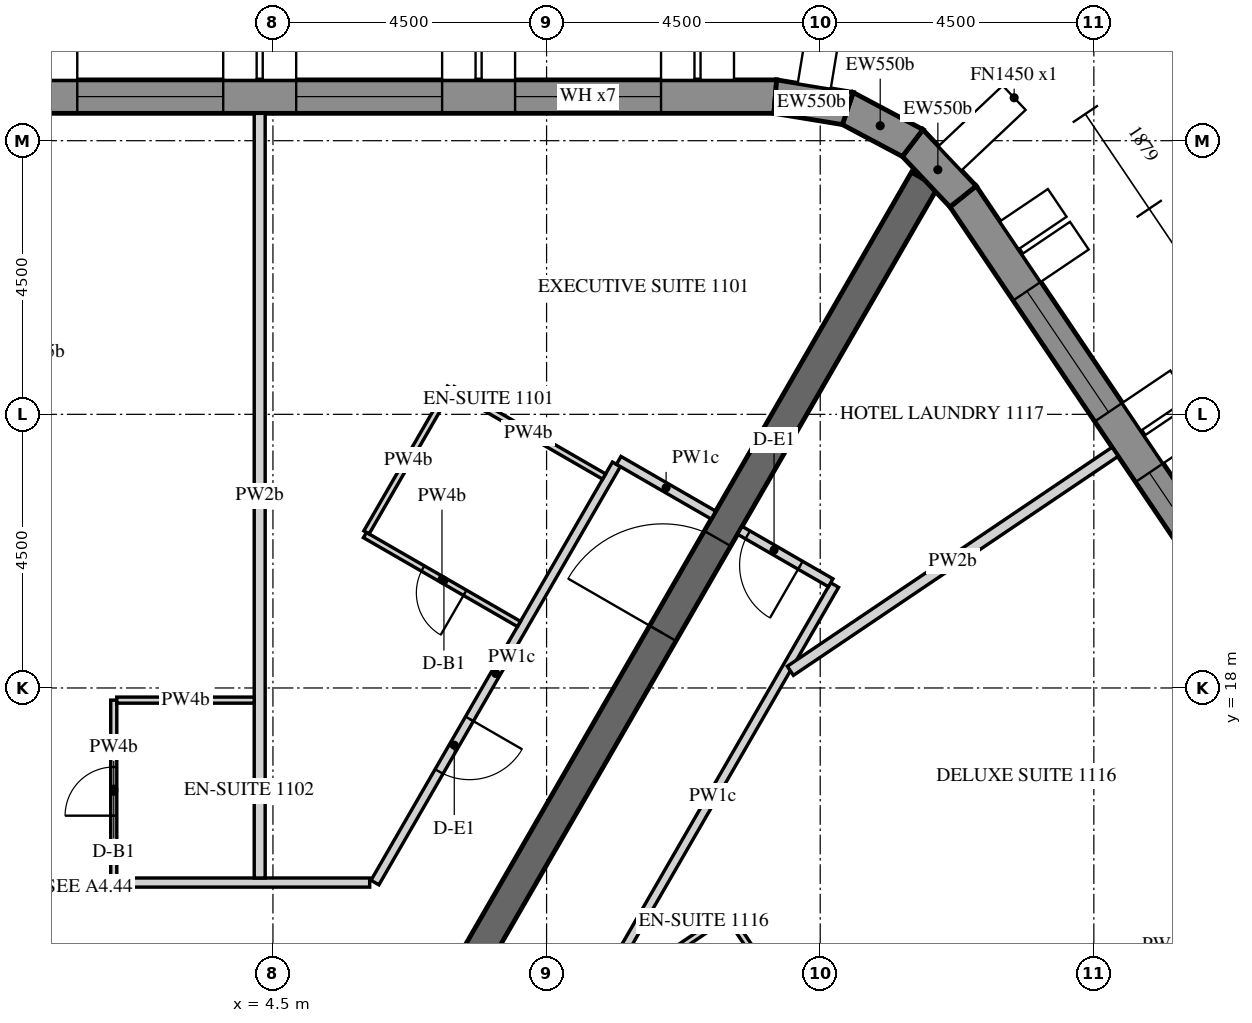
"""IFC4 building model, lengths in metres.
Left out: names, types, materials, properties, quantities, classifications, styles, units other than length and angle.
Written with IfcOpenShell. Run it as: python <this file> out.ifc"""

import sys

from ifc_helpers import new_model, si_unit, direction, frame, frame_2d, origin, place, context, subcontext, project, spatial, polyline, rectangle, outline, extrude, element, fill, save


model = new_model("IFC4")
c1 = context("Model", 3, precision=1e-05, world=origin(), true_north=direction((0.0, 1.0)))
c2 = subcontext(c1, "Body", "Model", "MODEL_VIEW")
j1 = project(units=[si_unit("LENGTHUNIT", "METRE"), si_unit("PLANEANGLEUNIT", "RADIAN")], contexts=[c1])
p1 = place(None, origin())
s1 = spatial("IfcSite", under=j1, at=p1, CompositionType="ELEMENT")
p2 = place(p1, origin())
s2 = spatial("IfcBuilding", under=s1, at=p2, CompositionType="ELEMENT")
p3 = place(p2, frame((0.0, 0.0, 152.7)))
s3 = spatial("IfcBuildingStorey", under=s2, at=p3, CompositionType="ELEMENT", Elevation=152.7)
p4 = place(p3, frame((12.761, 27.725, 0.0), z_axis=(0.0, 0.0, 1.0), x_axis=(-1.0, 0.0, 0.0)))
e1 = element("IfcWall", 1, at=p4, inside=s3, PredefinedType="SOLIDWALL", context=c2, shape_type="SweptSolid", body=[
    extrude(outline(polyline([(-0.022, -0.275), (27.783, -0.275), (27.732, 0.275), (0.022, 0.275), (-0.022, -0.275)])), origin(), (0.0, 0.0, 1.0), 3.75),
])
p5 = place(p4, frame((1.879, 0.0, 0.9)))
e2 = element("IfcOpeningElement", 2, at=p5, cuts=e1, PredefinedType="OPENING", context=c2, shape_type="SweptSolid", body=[
    extrude(rectangle(XDim=2.4, YDim=2.4, at=frame_2d((1.2, 1.2))), frame((0.0, 0.285, 0.0), z_axis=(0.0, -1.0, 0.0), x_axis=(1.0, 0.0, 0.0)), (0.0, 0.0, 1.0), 0.57),
])
p6 = place(p4, frame((5.479, 0.0, 0.9)))
e3 = element("IfcOpeningElement", 3, at=p6, cuts=e1, PredefinedType="OPENING", context=c2, shape_type="SweptSolid", body=[
    extrude(rectangle(XDim=2.4, YDim=2.4, at=frame_2d((1.2, 1.2))), frame((0.0, 0.285, 0.0), z_axis=(0.0, -1.0, 0.0), x_axis=(1.0, 0.0, 0.0)), (0.0, 0.0, 1.0), 0.57),
])
p7 = place(p4, frame((9.079, 0.0, 0.9)))
e4 = element("IfcOpeningElement", 4, at=p7, cuts=e1, PredefinedType="OPENING", context=c2, shape_type="SweptSolid", body=[
    extrude(rectangle(XDim=2.4, YDim=2.4, at=frame_2d((1.2, 1.2))), frame((0.0, 0.285, 0.0), z_axis=(0.0, -1.0, 0.0), x_axis=(1.0, 0.0, 0.0)), (0.0, 0.0, 1.0), 0.57),
])
p8 = place(p4, frame((12.679, 0.0, 0.9)))
e5 = element("IfcOpeningElement", 5, at=p8, cuts=e1, PredefinedType="OPENING", context=c2, shape_type="SweptSolid", body=[
    extrude(rectangle(XDim=2.4, YDim=2.4, at=frame_2d((1.2, 1.2))), frame((0.0, 0.285, 0.0), z_axis=(0.0, -1.0, 0.0), x_axis=(1.0, 0.0, 0.0)), (0.0, 0.0, 1.0), 0.57),
])
p9 = place(p4, frame((16.279, 0.0, 0.9)))
e6 = element("IfcOpeningElement", 6, at=p9, cuts=e1, PredefinedType="OPENING", context=c2, shape_type="SweptSolid", body=[
    extrude(rectangle(XDim=2.4, YDim=2.4, at=frame_2d((1.2, 1.2))), frame((0.0, 0.285, 0.0), z_axis=(0.0, -1.0, 0.0), x_axis=(1.0, 0.0, 0.0)), (0.0, 0.0, 1.0), 0.57),
])
p10 = place(p4, frame((19.879, 0.0, 0.9)))
e7 = element("IfcOpeningElement", 7, at=p10, cuts=e1, PredefinedType="OPENING", context=c2, shape_type="SweptSolid", body=[
    extrude(rectangle(XDim=2.4, YDim=2.4, at=frame_2d((1.2, 1.2))), frame((0.0, 0.285, 0.0), z_axis=(0.0, -1.0, 0.0), x_axis=(1.0, 0.0, 0.0)), (0.0, 0.0, 1.0), 0.57),
])
p11 = place(p4, frame((23.479, 0.0, 0.9)))
e8 = element("IfcOpeningElement", 8, at=p11, cuts=e1, PredefinedType="OPENING", context=c2, shape_type="SweptSolid", body=[
    extrude(rectangle(XDim=2.4, YDim=2.4, at=frame_2d((1.2, 1.2))), frame((0.0, 0.285, 0.0), z_axis=(0.0, -1.0, 0.0), x_axis=(1.0, 0.0, 0.0)), (0.0, 0.0, 1.0), 0.57),
])
p12 = place(p3, frame((31.371, 3.071, 0.0), z_axis=(0.0, 0.0, 1.0), x_axis=(-0.559189891278, 0.829039604297, 0.0)))
e9 = element("IfcWall", 9, at=p12, inside=s3, PredefinedType="SOLIDWALL", context=c2, shape_type="SweptSolid", body=[
    extrude(outline(polyline([(-0.026, -0.275), (27.781, -0.275), (27.736, 0.275), (0.026, 0.275), (-0.026, -0.275)])), origin(), (0.0, 0.0, 1.0), 3.75),
])
p13 = place(p12, frame((1.879, 0.0, 0.9)))
e10 = element("IfcOpeningElement", 10, at=p13, cuts=e9, PredefinedType="OPENING", context=c2, shape_type="SweptSolid", body=[
    extrude(rectangle(XDim=2.4, YDim=2.4, at=frame_2d((1.2, 1.2))), frame((0.0, 0.285, 0.0), z_axis=(0.0, -1.0, 0.0), x_axis=(1.0, 0.0, 0.0)), (0.0, 0.0, 1.0), 0.57),
])
p14 = place(p12, frame((5.479, 0.0, 0.9)))
e11 = element("IfcOpeningElement", 11, at=p14, cuts=e9, PredefinedType="OPENING", context=c2, shape_type="SweptSolid", body=[
    extrude(rectangle(XDim=2.4, YDim=2.4, at=frame_2d((1.2, 1.2))), frame((0.0, 0.285, 0.0), z_axis=(0.0, -1.0, 0.0), x_axis=(1.0, 0.0, 0.0)), (0.0, 0.0, 1.0), 0.57),
])
p15 = place(p12, frame((9.079, 0.0, 0.9)))
e12 = element("IfcOpeningElement", 12, at=p15, cuts=e9, PredefinedType="OPENING", context=c2, shape_type="SweptSolid", body=[
    extrude(rectangle(XDim=2.4, YDim=2.4, at=frame_2d((1.2, 1.2))), frame((0.0, 0.285, 0.0), z_axis=(0.0, -1.0, 0.0), x_axis=(1.0, 0.0, 0.0)), (0.0, 0.0, 1.0), 0.57),
])
p16 = place(p12, frame((12.679, 0.0, 0.9)))
e13 = element("IfcOpeningElement", 13, at=p16, cuts=e9, PredefinedType="OPENING", context=c2, shape_type="SweptSolid", body=[
    extrude(rectangle(XDim=2.4, YDim=2.4, at=frame_2d((1.2, 1.2))), frame((0.0, 0.285, 0.0), z_axis=(0.0, -1.0, 0.0), x_axis=(1.0, 0.0, 0.0)), (0.0, 0.0, 1.0), 0.57),
])
p17 = place(p12, frame((16.279, 0.0, 0.9)))
e14 = element("IfcOpeningElement", 14, at=p17, cuts=e9, PredefinedType="OPENING", context=c2, shape_type="SweptSolid", body=[
    extrude(rectangle(XDim=2.4, YDim=2.4, at=frame_2d((1.2, 1.2))), frame((0.0, 0.285, 0.0), z_axis=(0.0, -1.0, 0.0), x_axis=(1.0, 0.0, 0.0)), (0.0, 0.0, 1.0), 0.57),
])
p18 = place(p12, frame((19.879, 0.0, 0.9)))
e15 = element("IfcOpeningElement", 15, at=p18, cuts=e9, PredefinedType="OPENING", context=c2, shape_type="SweptSolid", body=[
    extrude(rectangle(XDim=2.4, YDim=2.4, at=frame_2d((1.2, 1.2))), frame((0.0, 0.285, 0.0), z_axis=(0.0, -1.0, 0.0), x_axis=(1.0, 0.0, 0.0)), (0.0, 0.0, 1.0), 0.57),
])
p19 = place(p12, frame((23.479, 0.0, 0.9)))
e16 = element("IfcOpeningElement", 16, at=p19, cuts=e9, PredefinedType="OPENING", context=c2, shape_type="SweptSolid", body=[
    extrude(rectangle(XDim=2.4, YDim=2.4, at=frame_2d((1.2, 1.2))), frame((0.0, 0.285, 0.0), z_axis=(0.0, -1.0, 0.0), x_axis=(1.0, 0.0, 0.0)), (0.0, 0.0, 1.0), 0.57),
])
p20 = place(p3, frame((15.849, 26.083, 0.0), z_axis=(0.0, 0.0, 1.0), x_axis=(-0.686196220404, 0.727416488061, 0.0)))
e17 = element("IfcWall", 17, at=p20, inside=s3, PredefinedType="SOLIDWALL", context=c2, shape_type="SweptSolid", body=[
    extrude(outline(polyline([(-0.022, -0.275), (1.253, -0.275), (1.163, 0.275), (0.022, 0.275), (-0.022, -0.275)])), origin(), (0.0, 0.0, 1.0), 3.75),
])
p21 = place(p3, frame((15.02, 26.962, 0.0), z_axis=(0.0, 0.0, 1.0), x_axis=(-0.882950818639, 0.469465495926, 0.0)))
e18 = element("IfcWall", 18, at=p21, inside=s3, PredefinedType="SOLIDWALL", context=c2, shape_type="SweptSolid", body=[
    extrude(outline(polyline([(-0.045, -0.275), (1.253, -0.275), (1.163, 0.275), (0.045, 0.275), (-0.045, -0.275)])), origin(), (0.0, 0.0, 1.0), 3.75),
])
p22 = place(p3, frame((13.953, 27.529, 0.0), z_axis=(0.0, 0.0, 1.0), x_axis=(-0.986751945211, 0.162236243244, 0.0)))
e19 = element("IfcWall", 19, at=p22, inside=s3, PredefinedType="SOLIDWALL", context=c2, shape_type="SweptSolid", body=[
    extrude(outline(polyline([(-0.045, -0.275), (1.231, -0.275), (1.186, 0.275), (0.045, 0.275), (-0.045, -0.275)])), origin(), (0.0, 0.0, 1.0), 3.75),
])
p23 = place(p3, frame((7.506, 13.0, 0.0), z_axis=(0.0, 0.0, 1.0), x_axis=(0.499988271576, 0.866032175087, 0.0)))
e20 = element("IfcWall", 20, at=p23, inside=s3, PredefinedType="SHEAR", context=c2, shape_type="SweptSolid", body=[
    extrude(rectangle(XDim=15.424, YDim=0.5, at=frame_2d((7.712, 0.0))), origin(), (0.0, 0.0, 1.0), 3.75),
])
p24 = place(p23, frame((6.812, 0.0, 0.0)))
e21 = element("IfcOpeningElement", 21, at=p24, cuts=e20, PredefinedType="OPENING", context=c2, shape_type="SweptSolid", body=[
    extrude(rectangle(XDim=1.8, YDim=2.4, at=frame_2d((0.9, 1.2))), frame((0.0, 0.26, 0.0), z_axis=(0.0, -1.0, 0.0), x_axis=(1.0, 0.0, 0.0)), (0.0, 0.0, 1.0), 0.52),
])
p25 = place(p3, frame((10.149, 21.678, 0.0), z_axis=(0.0, 0.0, 1.0), x_axis=(-0.499997422768, -0.866026891745, 0.0)))
e22 = element("IfcWall", 22, at=p25, inside=s3, PredefinedType="PARTITIONING", context=c2, shape_type="SweptSolid", body=[
    extrude(rectangle(XDim=7.942, YDim=0.15, at=frame_2d((3.971, 0.0))), origin(), (0.0, 0.0, 1.0), 2.823),
])
p26 = place(p25, frame((4.833, 0.0, 0.0)))
e23 = element("IfcOpeningElement", 23, at=p26, cuts=e22, PredefinedType="OPENING", context=c2, shape_type="SweptSolid", body=[
    extrude(rectangle(XDim=1.0, YDim=2.1, at=frame_2d((0.5, 1.05))), frame((0.0, 0.085, 0.0), z_axis=(0.0, -1.0, 0.0), x_axis=(1.0, 0.0, 0.0)), (0.0, 0.0, 1.0), 0.17),
])
p27 = place(p3, frame((6.091, 14.8, 0.0), z_axis=(0.0, 0.0, 1.0), x_axis=(-1.0, 0.0, 0.0)))
e24 = element("IfcWall", 24, at=p27, inside=s3, PredefinedType="PARTITIONING", context=c2, shape_type="SweptSolid", body=[
    extrude(rectangle(XDim=14.636, YDim=0.15, at=frame_2d((7.318, 0.0))), origin(), (0.0, 0.0, 1.0), 2.823),
])
p28 = place(p27, frame((7.909, 0.0, 0.0)))
e25 = element("IfcOpeningElement", 25, at=p28, cuts=e24, PredefinedType="OPENING", context=c2, shape_type="SweptSolid", body=[
    extrude(rectangle(XDim=1.0, YDim=2.1, at=frame_2d((0.5, 1.05))), frame((0.0, 0.085, 0.0), z_axis=(0.0, -1.0, 0.0), x_axis=(1.0, 0.0, 0.0)), (0.0, 0.0, 1.0), 0.17),
])
p29 = place(p3, frame((11.745, 20.843, 0.0), z_axis=(0.0, 0.0, 1.0), x_axis=(-0.865989075817, 0.500062916607, 0.0)))
e26 = element("IfcWall", 26, at=p29, inside=s3, PredefinedType="PARTITIONING", context=c2, shape_type="SweptSolid", body=[
    extrude(rectangle(XDim=1.8, YDim=0.15, at=frame_2d((0.9, 0.0))), origin(), (0.0, 0.0, 1.0), 2.823),
])
p30 = place(p3, frame((9.728, 12.75, 0.0), z_axis=(0.0, 0.0, 1.0), x_axis=(0.500007149838, 0.866021275784, 0.0)))
e27 = element("IfcWall", 27, at=p30, inside=s3, PredefinedType="PARTITIONING", context=c2, shape_type="SweptSolid", body=[
    extrude(rectangle(XDim=8.017, YDim=0.15, at=frame_2d((4.009, 0.0))), origin(), (0.0, 0.0, 1.0), 2.823),
])
p31 = place(p3, frame((13.672, 19.73, 0.0), z_axis=(0.0, 0.0, 1.0), x_axis=(-0.866074815912, 0.499914405916, 0.0)))
e28 = element("IfcWall", 28, at=p31, inside=s3, PredefinedType="PARTITIONING", context=c2, shape_type="SweptSolid", body=[
    extrude(rectangle(XDim=1.725, YDim=0.15, at=frame_2d((0.862, 0.0))), origin(), (0.0, 0.0, 1.0), 2.823),
])
p32 = place(p31, frame((0.575, 0.0, 0.0)))
e29 = element("IfcOpeningElement", 29, at=p32, cuts=e28, PredefinedType="OPENING", context=c2, shape_type="SweptSolid", body=[
    extrude(rectangle(XDim=1.0, YDim=2.1, at=frame_2d((0.5, 1.05))), frame((0.0, 0.085, 0.0), z_axis=(0.0, -1.0, 0.0), x_axis=(1.0, 0.0, 0.0)), (0.0, 0.0, 1.0), 0.17),
])
p33 = place(p3, frame((8.546, 19.052, 0.0), z_axis=(0.0, 0.0, 1.0), x_axis=(-0.866046596414, 0.499963291492, 0.0)))
e30 = element("IfcWall", 30, at=p33, inside=s3, PredefinedType="PARTITIONING", context=c2, shape_type="SweptSolid", body=[
    extrude(rectangle(XDim=2.925, YDim=0.1, at=frame_2d((1.462, 0.0))), origin(), (0.0, 0.0, 1.0), 2.823),
])
p34 = place(p33, frame((1.025, 0.0, 0.0)))
e31 = element("IfcOpeningElement", 31, at=p34, cuts=e30, PredefinedType="OPENING", context=c2, shape_type="SweptSolid", body=[
    extrude(rectangle(XDim=0.8, YDim=2.1, at=frame_2d((0.4, 1.05))), frame((0.0, 0.06, 0.0), z_axis=(0.0, -1.0, 0.0), x_axis=(1.0, 0.0, 0.0)), (0.0, 0.0, 1.0), 0.12),
])
p35 = place(p3, frame((6.038, 20.558, 0.0), z_axis=(0.0, 0.0, 1.0), x_axis=(0.499996545922, 0.866027397988, 0.0)))
e32 = element("IfcWall", 32, at=p35, inside=s3, PredefinedType="PARTITIONING", context=c2, shape_type="SweptSolid", body=[
    extrude(rectangle(XDim=2.75, YDim=0.1, at=frame_2d((1.375, 0.0))), origin(), (0.0, 0.0, 1.0), 2.823),
])
p36 = place(p3, frame((7.456, 22.915, 0.0), z_axis=(0.0, 0.0, 1.0), x_axis=(0.866018712932, -0.500011588718, 0.0)))
e33 = element("IfcWall", 33, at=p36, inside=s3, PredefinedType="PARTITIONING", context=c2, shape_type="SweptSolid", body=[
    extrude(rectangle(XDim=2.875, YDim=0.1, at=frame_2d((1.438, 0.0))), origin(), (0.0, 0.0, 1.0), 2.823),
])
p37 = place(p3, frame((4.282, 27.45, 0.0), z_axis=(0.0, 0.0, 1.0), x_axis=(0.0, -1.0, 0.0)))
e34 = element("IfcWall", 34, at=p37, inside=s3, PredefinedType="PARTITIONING", context=c2, shape_type="SweptSolid", body=[
    extrude(rectangle(XDim=12.575, YDim=0.18, at=frame_2d((6.288, 0.0))), origin(), (0.0, 0.0, 1.0), 2.823),
])
p38 = place(p3, frame((1.882, 14.875, 0.0), z_axis=(0.0, 0.0, 1.0), x_axis=(0.0, 1.0, 0.0)))
e35 = element("IfcWall", 35, at=p38, inside=s3, PredefinedType="PARTITIONING", context=c2, shape_type="SweptSolid", body=[
    extrude(rectangle(XDim=2.925, YDim=0.1, at=frame_2d((1.462, 0.0))), origin(), (0.0, 0.0, 1.0), 2.823),
])
p39 = place(p38, frame((1.025, 0.0, 0.0)))
e36 = element("IfcOpeningElement", 36, at=p39, cuts=e35, PredefinedType="OPENING", context=c2, shape_type="SweptSolid", body=[
    extrude(rectangle(XDim=0.8, YDim=2.1, at=frame_2d((0.4, 1.05))), frame((0.0, 0.06, 0.0), z_axis=(0.0, -1.0, 0.0), x_axis=(1.0, 0.0, 0.0)), (0.0, 0.0, 1.0), 0.12),
])
p40 = place(p3, frame((1.932, 17.8, 0.0), z_axis=(0.0, 0.0, 1.0), x_axis=(1.0, 0.0, 0.0)))
e37 = element("IfcWall", 37, at=p40, inside=s3, PredefinedType="PARTITIONING", context=c2, shape_type="SweptSolid", body=[
    extrude(rectangle(XDim=2.26, YDim=0.1, at=frame_2d((1.13, 0.0))), origin(), (0.0, 0.0, 1.0), 2.823),
])
p41 = place(p3, frame((9.87, 12.846, 0.0), z_axis=(0.0, 0.0, 1.0), x_axis=(0.829045266323, 0.559181496821, 0.0)))
e38 = element("IfcWall", 38, at=p41, inside=s3, PredefinedType="PARTITIONING", context=c2, shape_type="SweptSolid", body=[
    extrude(rectangle(XDim=2.548, YDim=0.1, at=frame_2d((1.274, 0.0))), origin(), (0.0, 0.0, 1.0), 2.823),
])
p42 = place(p3, frame((12.01, 14.229, 0.0), z_axis=(0.0, 0.0, 1.0), x_axis=(0.559158698756, -0.8290606429, 0.0)))
e39 = element("IfcWall", 39, at=p42, inside=s3, PredefinedType="PARTITIONING", context=c2, shape_type="SweptSolid", body=[
    extrude(rectangle(XDim=2.75, YDim=0.1, at=frame_2d((1.375, 0.0))), origin(), (0.0, 0.0, 1.0), 2.823),
])
p43 = place(p3, frame((16.003, 11.617, 0.0), z_axis=(0.0, 0.0, 1.0), x_axis=(0.829037886281, 0.559192438352, 0.0)))
e40 = element("IfcWall", 40, at=p43, inside=s3, PredefinedType="PARTITIONING", context=c2, shape_type="SweptSolid", body=[
    extrude(rectangle(XDim=7.687, YDim=0.1, at=frame_2d((3.843, 0.0))), origin(), (0.0, 0.0, 1.0), 2.823),
])
p44 = place(p3, frame((18.35, 21.884, 0.0), z_axis=(0.0, 0.0, 1.0), x_axis=(-0.829047205772, -0.559178621374, 0.0)))
e41 = element("IfcWall", 41, at=p44, inside=s3, PredefinedType="PARTITIONING", context=c2, shape_type="SweptSolid", body=[
    extrude(rectangle(XDim=6.442, YDim=0.18, at=frame_2d((3.221, 0.0))), origin(), (0.0, 0.0, 1.0), 2.823),
])
p45 = place(p5, frame((0.0, 0.205, 0.0)))
e42 = element("IfcWindow", 42, at=p45, inside=s3, PartitioningType="DOUBLE_PANEL_VERTICAL", PredefinedType="WINDOW", context=c2, shape_type="SweptSolid", body=[
    extrude(rectangle(XDim=2.4, YDim=2.4, at=frame_2d((1.2, 1.2))), frame((0.0, 0.03, 0.0), z_axis=(0.0, -1.0, 0.0), x_axis=(1.0, 0.0, 0.0)), (0.0, 0.0, 1.0), 0.06),
])
fill(e2, e42)
p46 = place(p6, frame((0.0, 0.205, 0.0)))
e43 = element("IfcWindow", 43, at=p46, inside=s3, PartitioningType="DOUBLE_PANEL_VERTICAL", PredefinedType="WINDOW", context=c2, shape_type="SweptSolid", body=[
    extrude(rectangle(XDim=2.4, YDim=2.4, at=frame_2d((1.2, 1.2))), frame((0.0, 0.03, 0.0), z_axis=(0.0, -1.0, 0.0), x_axis=(1.0, 0.0, 0.0)), (0.0, 0.0, 1.0), 0.06),
])
fill(e3, e43)
p47 = place(p7, frame((0.0, 0.205, 0.0)))
e44 = element("IfcWindow", 44, at=p47, inside=s3, PartitioningType="DOUBLE_PANEL_VERTICAL", PredefinedType="WINDOW", context=c2, shape_type="SweptSolid", body=[
    extrude(rectangle(XDim=2.4, YDim=2.4, at=frame_2d((1.2, 1.2))), frame((0.0, 0.03, 0.0), z_axis=(0.0, -1.0, 0.0), x_axis=(1.0, 0.0, 0.0)), (0.0, 0.0, 1.0), 0.06),
])
fill(e4, e44)
p48 = place(p18, frame((0.0, 0.205, 0.0)))
e45 = element("IfcWindow", 45, at=p48, inside=s3, PartitioningType="DOUBLE_PANEL_VERTICAL", PredefinedType="WINDOW", context=c2, shape_type="SweptSolid", body=[
    extrude(rectangle(XDim=2.4, YDim=2.4, at=frame_2d((1.2, 1.2))), frame((0.0, 0.03, 0.0), z_axis=(0.0, -1.0, 0.0), x_axis=(1.0, 0.0, 0.0)), (0.0, 0.0, 1.0), 0.06),
])
fill(e15, e45)
p49 = place(p19, frame((0.0, 0.205, 0.0)))
e46 = element("IfcWindow", 46, at=p49, inside=s3, PartitioningType="DOUBLE_PANEL_VERTICAL", PredefinedType="WINDOW", context=c2, shape_type="SweptSolid", body=[
    extrude(rectangle(XDim=2.4, YDim=2.4, at=frame_2d((1.2, 1.2))), frame((0.0, 0.03, 0.0), z_axis=(0.0, -1.0, 0.0), x_axis=(1.0, 0.0, 0.0)), (0.0, 0.0, 1.0), 0.06),
])
fill(e16, e46)
p50 = place(p24, origin())
e47 = element("IfcDoor", 47, at=p50, inside=s3, OperationType="DOUBLE_DOOR_SINGLE_SWING", PredefinedType="DOOR", context=c2, shape_type="SweptSolid", body=[
    extrude(rectangle(XDim=1.8, YDim=2.4, at=frame_2d((0.9, 1.2))), frame((0.0, 0.025, 0.0), z_axis=(0.0, -1.0, 0.0), x_axis=(1.0, 0.0, 0.0)), (0.0, 0.0, 1.0), 0.05),
])
fill(e21, e47)
p51 = place(p26, origin())
e48 = element("IfcDoor", 48, at=p51, inside=s3, OperationType="SINGLE_SWING_LEFT", PredefinedType="DOOR", context=c2, shape_type="SweptSolid", body=[
    extrude(rectangle(XDim=1.0, YDim=2.1, at=frame_2d((0.5, 1.05))), frame((0.0, 0.025, 0.0), z_axis=(0.0, -1.0, 0.0), x_axis=(1.0, 0.0, 0.0)), (0.0, 0.0, 1.0), 0.05),
])
fill(e23, e48)
p52 = place(p34, origin())
e49 = element("IfcDoor", 49, at=p52, inside=s3, OperationType="SINGLE_SWING_RIGHT", PredefinedType="DOOR", context=c2, shape_type="SweptSolid", body=[
    extrude(rectangle(XDim=0.8, YDim=2.1, at=frame_2d((0.4, 1.05))), frame((0.0, 0.025, 0.0), z_axis=(0.0, -1.0, 0.0), x_axis=(1.0, 0.0, 0.0)), (0.0, 0.0, 1.0), 0.05),
])
fill(e31, e49)
p53 = place(p39, origin())
e50 = element("IfcDoor", 50, at=p53, inside=s3, OperationType="SINGLE_SWING_RIGHT", PredefinedType="DOOR", context=c2, shape_type="SweptSolid", body=[
    extrude(rectangle(XDim=0.8, YDim=2.1, at=frame_2d((0.4, 1.05))), frame((0.0, 0.025, 0.0), z_axis=(0.0, -1.0, 0.0), x_axis=(1.0, 0.0, 0.0)), (0.0, 0.0, 1.0), 0.05),
])
fill(e36, e50)
p54 = place(p32, origin())
e51 = element("IfcDoor", 51, at=p54, inside=s3, OperationType="SINGLE_SWING_LEFT", PredefinedType="DOOR", context=c2, shape_type="SweptSolid", body=[
    extrude(rectangle(XDim=1.0, YDim=2.1, at=frame_2d((0.5, 1.05))), frame((0.0, 0.025, 0.0), z_axis=(0.0, -1.0, 0.0), x_axis=(1.0, 0.0, 0.0)), (0.0, 0.0, 1.0), 0.05),
])
fill(e29, e51)
save(model, sys.argv[1])
